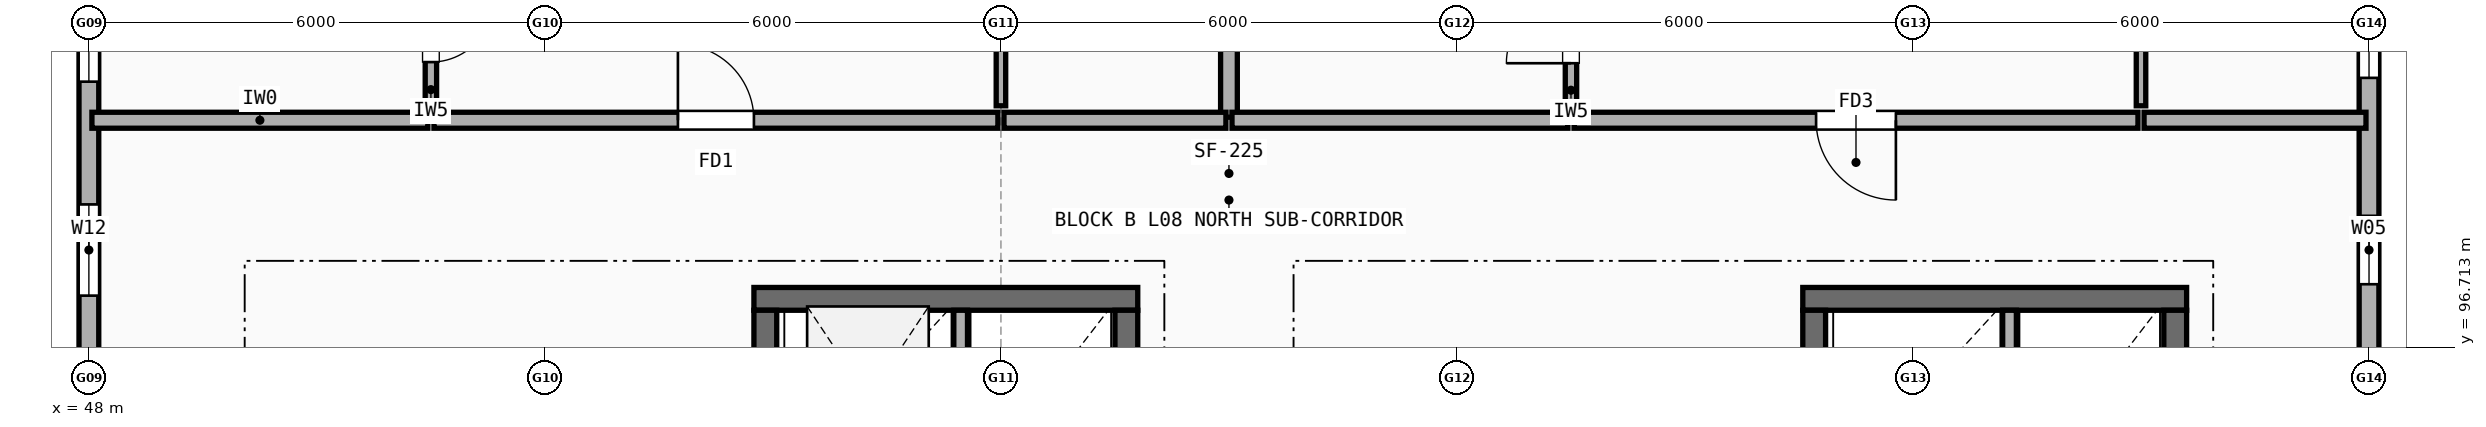
"""IFC4 building model, lengths in metres.
Left out: names, types, materials, properties, quantities, classifications, styles, units other than length and angle.
Written with IfcOpenShell. Run it as: python <this file> out.ifc"""

import sys

from ifc_helpers import new_model, si_unit, direction, frame, frame_2d, origin, place, context, subcontext, project, spatial, rectangle, extrude, element, fill, save


model = new_model("IFC4")
c1 = context("Model", 3, precision=1e-05, world=origin(), true_north=direction((0.0, 1.0)))
c2 = subcontext(c1, "Body", "Model", "MODEL_VIEW")
j1 = project(units=[si_unit("LENGTHUNIT", "METRE"), si_unit("PLANEANGLEUNIT", "RADIAN")], contexts=[c1])
p1 = place(None, origin())
s1 = spatial("IfcSite", under=j1, at=p1, CompositionType="ELEMENT")
p2 = place(p1, origin())
s2 = spatial("IfcBuilding", under=s1, at=p2, CompositionType="ELEMENT")
p3 = place(p2, frame((0.0, 0.0, 26.9)))
s3 = spatial("IfcBuildingStorey", under=s2, at=p3, CompositionType="ELEMENT", Elevation=26.9)
p4 = place(p3, frame((78.0, 96.325, 0.0), z_axis=(0.0, 0.0, 1.0), x_axis=(0.0, 1.0, 0.0)))
e1 = element("IfcWall", 1, at=p4, inside=s3, PredefinedType="STANDARD", context=c2, shape_type="SweptSolid", body=[
    extrude(rectangle(XDim=5.35, YDim=0.26, at=frame_2d((2.675, 0.0))), origin(), (0.0, 0.0, 1.0), 2.462),
])
p5 = place(p4, frame((1.218, 0.0, 0.9)))
e2 = element("IfcOpeningElement", 2, at=p5, cuts=e1, PredefinedType="OPENING", context=c2, shape_type="SweptSolid", body=[
    extrude(rectangle(XDim=0.9, YDim=1.4, at=frame_2d((0.45, 0.7))), frame((0.0, 0.14, 0.0), z_axis=(0.0, -1.0, 0.0), x_axis=(1.0, 0.0, 0.0)), (0.0, 0.0, 1.0), 0.28),
])
p6 = place(p4, frame((3.933, 0.0, 0.9)))
e3 = element("IfcOpeningElement", 3, at=p6, cuts=e1, PredefinedType="OPENING", context=c2, shape_type="SweptSolid", body=[
    extrude(rectangle(XDim=0.9, YDim=1.4, at=frame_2d((0.45, 0.7))), frame((0.0, 0.14, 0.0), z_axis=(0.0, -1.0, 0.0), x_axis=(1.0, 0.0, 0.0)), (0.0, 0.0, 1.0), 0.28),
])
p7 = place(p3, frame((48.0, 101.675, 0.0), z_axis=(0.0, 0.0, 1.0), x_axis=(0.0, -1.0, 0.0)))
e4 = element("IfcWall", 4, at=p7, inside=s3, PredefinedType="STANDARD", context=c2, shape_type="SweptSolid", body=[
    extrude(rectangle(XDim=5.35, YDim=0.26, at=frame_2d((2.675, 0.0))), origin(), (0.0, 0.0, 1.0), 2.462),
])
p8 = place(p7, frame((0.468, 0.0, 0.9)))
e5 = element("IfcOpeningElement", 5, at=p8, cuts=e4, PredefinedType="OPENING", context=c2, shape_type="SweptSolid", body=[
    extrude(rectangle(XDim=1.0, YDim=1.4, at=frame_2d((0.5, 0.7))), frame((0.0, 0.14, 0.0), z_axis=(0.0, -1.0, 0.0), x_axis=(1.0, 0.0, 0.0)), (0.0, 0.0, 1.0), 0.28),
])
p9 = place(p7, frame((3.083, 0.0, 0.9)))
e6 = element("IfcOpeningElement", 6, at=p9, cuts=e4, PredefinedType="OPENING", context=c2, shape_type="SweptSolid", body=[
    extrude(rectangle(XDim=1.2, YDim=1.35, at=frame_2d((0.6, 0.675))), frame((0.0, 0.14, 0.0), z_axis=(0.0, -1.0, 0.0), x_axis=(1.0, 0.0, 0.0)), (0.0, 0.0, 1.0), 0.28),
])
p10 = place(p3, frame((61.8, 97.35, 0.0), z_axis=(0.0, 0.0, 1.0), x_axis=(-1.0, 0.0, 0.0)))
e7 = element("IfcWall", 7, at=p10, inside=s3, PredefinedType="SHEAR", context=c2, shape_type="SweptSolid", body=[
    extrude(rectangle(XDim=5.05, YDim=0.3, at=frame_2d((2.525, 0.0))), origin(), (0.0, 0.0, 1.0), 2.98),
])
p11 = place(p3, frame((61.65, 90.75, 0.0), z_axis=(0.0, 0.0, 1.0), x_axis=(0.0, 1.0, 0.0)))
e8 = element("IfcWall", 8, at=p11, inside=s3, PredefinedType="SHEAR", context=c2, shape_type="SweptSolid", body=[
    extrude(rectangle(XDim=6.45, YDim=0.3, at=frame_2d((3.225, 0.0))), origin(), (0.0, 0.0, 1.0), 2.98),
])
p12 = place(p3, frame((56.9, 93.75, 0.0), z_axis=(0.0, 0.0, 1.0), x_axis=(0.0, 1.0, 0.0)))
e9 = element("IfcWall", 9, at=p12, inside=s3, PredefinedType="SHEAR", context=c2, shape_type="SweptSolid", body=[
    extrude(rectangle(XDim=3.45, YDim=0.3, at=frame_2d((1.725, 0.0))), origin(), (0.0, 0.0, 1.0), 2.98),
])
p13 = place(p3, frame((59.47, 94.94, 0.0), z_axis=(0.0, 0.0, 1.0), x_axis=(0.0, 1.0, 0.0)))
e10 = element("IfcWall", 10, at=p13, inside=s3, PredefinedType="SOLIDWALL", context=c2, shape_type="SweptSolid", body=[
    extrude(rectangle(XDim=2.26, YDim=0.18, at=frame_2d((1.13, 0.0))), origin(), (0.0, 0.0, 1.0), 2.98),
])
p14 = place(p3, frame((75.6, 97.35, 0.0), z_axis=(0.0, 0.0, 1.0), x_axis=(-1.0, 0.0, 0.0)))
e11 = element("IfcWall", 11, at=p14, inside=s3, PredefinedType="SHEAR", context=c2, shape_type="SweptSolid", body=[
    extrude(rectangle(XDim=5.05, YDim=0.3, at=frame_2d((2.525, 0.0))), origin(), (0.0, 0.0, 1.0), 2.98),
])
p15 = place(p3, frame((75.45, 90.75, 0.0), z_axis=(0.0, 0.0, 1.0), x_axis=(0.0, 1.0, 0.0)))
e12 = element("IfcWall", 12, at=p15, inside=s3, PredefinedType="SHEAR", context=c2, shape_type="SweptSolid", body=[
    extrude(rectangle(XDim=6.45, YDim=0.3, at=frame_2d((3.225, 0.0))), origin(), (0.0, 0.0, 1.0), 2.98),
])
p16 = place(p3, frame((70.7, 93.65, 0.0), z_axis=(0.0, 0.0, 1.0), x_axis=(0.0, 1.0, 0.0)))
e13 = element("IfcWall", 13, at=p16, inside=s3, PredefinedType="SHEAR", context=c2, shape_type="SweptSolid", body=[
    extrude(rectangle(XDim=3.55, YDim=0.3, at=frame_2d((1.775, 0.0))), origin(), (0.0, 0.0, 1.0), 2.98),
])
p17 = place(p3, frame((73.27, 94.94, 0.0), z_axis=(0.0, 0.0, 1.0), x_axis=(0.0, 1.0, 0.0)))
e14 = element("IfcWall", 14, at=p17, inside=s3, PredefinedType="SOLIDWALL", context=c2, shape_type="SweptSolid", body=[
    extrude(rectangle(XDim=2.26, YDim=0.18, at=frame_2d((1.13, 0.0))), origin(), (0.0, 0.0, 1.0), 2.98),
])
p18 = place(p3, frame((63.0, 99.74, 0.0), z_axis=(0.0, 0.0, 1.0), x_axis=(0.0, 1.0, 0.0)))
e15 = element("IfcWall", 15, at=p18, inside=s3, PredefinedType="SOLIDWALL", context=c2, shape_type="SweptSolid", body=[
    extrude(rectangle(XDim=13.87, YDim=0.22, at=frame_2d((6.935, 0.0))), origin(), (0.0, 0.0, 1.0), 2.462),
])
p19 = place(p3, frame((48.04, 99.7, 0.0), z_axis=(0.0, 0.0, 1.0), x_axis=(1.0, 0.0, 0.0)))
e16 = element("IfcWall", 16, at=p19, inside=s3, PredefinedType="SOLIDWALL", context=c2, shape_type="SweptSolid", body=[
    extrude(rectangle(XDim=4.42, YDim=0.21, at=frame_2d((2.21, 0.0))), origin(), (0.0, 0.0, 1.0), 2.462),
])
p20 = place(p3, frame((52.54, 99.7, 0.0), z_axis=(0.0, 0.0, 1.0), x_axis=(1.0, 0.0, 0.0)))
e17 = element("IfcWall", 17, at=p20, inside=s3, PredefinedType="SOLIDWALL", context=c2, shape_type="SweptSolid", body=[
    extrude(rectangle(XDim=7.42, YDim=0.21, at=frame_2d((3.71, 0.0))), origin(), (0.0, 0.0, 1.0), 2.508),
])
p21 = place(p20, frame((3.21, 0.0, 0.0)))
e18 = element("IfcOpeningElement", 18, at=p21, cuts=e17, PredefinedType="OPENING", context=c2, shape_type="SweptSolid", body=[
    extrude(rectangle(XDim=1.0, YDim=2.15, at=frame_2d((0.5, 1.075))), frame((0.0, 0.115, 0.0), z_axis=(0.0, -1.0, 0.0), x_axis=(1.0, 0.0, 0.0)), (0.0, 0.0, 1.0), 0.23),
])
p22 = place(p3, frame((52.5, 99.89, 0.0), z_axis=(0.0, 0.0, 1.0), x_axis=(0.0, 1.0, 0.0)))
e19 = element("IfcWall", 19, at=p22, inside=s3, PredefinedType="PARTITIONING", context=c2, shape_type="SweptSolid", body=[
    extrude(rectangle(XDim=1.97, YDim=0.15, at=frame_2d((0.985, 0.0))), origin(), (0.0, 0.0, 1.0), 2.98),
])
p23 = place(p22, frame((0.575, 0.0, 0.0)))
e20 = element("IfcOpeningElement", 20, at=p23, cuts=e19, PredefinedType="OPENING", context=c2, shape_type="SweptSolid", body=[
    extrude(rectangle(XDim=0.82, YDim=2.08, at=frame_2d((0.41, 1.04))), frame((0.0, 0.085, 0.0), z_axis=(0.0, -1.0, 0.0), x_axis=(1.0, 0.0, 0.0)), (0.0, 0.0, 1.0), 0.17),
])
p24 = place(p3, frame((60.04, 99.7, 0.0), z_axis=(0.0, 0.0, 1.0), x_axis=(1.0, 0.0, 0.0)))
e21 = element("IfcWall", 21, at=p24, inside=s3, PredefinedType="SOLIDWALL", context=c2, shape_type="SweptSolid", body=[
    extrude(rectangle(XDim=2.92, YDim=0.21, at=frame_2d((1.46, 0.0))), origin(), (0.0, 0.0, 1.0), 2.508),
])
p25 = place(p3, frame((60.0, 99.89, 0.0), z_axis=(0.0, 0.0, 1.0), x_axis=(0.0, 1.0, 0.0)))
e22 = element("IfcWall", 22, at=p25, inside=s3, PredefinedType="PARTITIONING", context=c2, shape_type="SweptSolid", body=[
    extrude(rectangle(XDim=13.6, YDim=0.125, at=frame_2d((6.8, 0.0))), origin(), (0.0, 0.0, 1.0), 2.458),
])
p26 = place(p25, frame((6.65, 0.0, 0.0)))
e23 = element("IfcOpeningElement", 23, at=p26, cuts=e22, PredefinedType="OPENING", context=c2, shape_type="SweptSolid", body=[
    extrude(rectangle(XDim=0.88, YDim=2.1, at=frame_2d((0.44, 1.05))), frame((0.0, 0.073, 0.0), z_axis=(0.0, -1.0, 0.0), x_axis=(1.0, 0.0, 0.0)), (0.0, 0.0, 1.0), 0.145),
])
p27 = place(p3, frame((63.04, 99.7, 0.0), z_axis=(0.0, 0.0, 1.0), x_axis=(1.0, 0.0, 0.0)))
e24 = element("IfcWall", 24, at=p27, inside=s3, PredefinedType="SOLIDWALL", context=c2, shape_type="SweptSolid", body=[
    extrude(rectangle(XDim=4.42, YDim=0.21, at=frame_2d((2.21, 0.0))), origin(), (0.0, 0.0, 1.0), 2.98),
])
p28 = place(p3, frame((67.54, 99.7, 0.0), z_axis=(0.0, 0.0, 1.0), x_axis=(1.0, 0.0, 0.0)))
e25 = element("IfcWall", 25, at=p28, inside=s3, PredefinedType="SOLIDWALL", context=c2, shape_type="SweptSolid", body=[
    extrude(rectangle(XDim=7.42, YDim=0.21, at=frame_2d((3.71, 0.0))), origin(), (0.0, 0.0, 1.0), 2.98),
])
p29 = place(p28, frame((3.185, 0.0, 0.0)))
e26 = element("IfcOpeningElement", 26, at=p29, cuts=e25, PredefinedType="OPENING", context=c2, shape_type="SweptSolid", body=[
    extrude(rectangle(XDim=1.05, YDim=2.15, at=frame_2d((0.525, 1.075))), frame((0.0, 0.115, 0.0), z_axis=(0.0, -1.0, 0.0), x_axis=(1.0, 0.0, 0.0)), (0.0, 0.0, 1.0), 0.23),
])
p30 = place(p3, frame((67.5, 99.89, 0.0), z_axis=(0.0, 0.0, 1.0), x_axis=(0.0, 1.0, 0.0)))
e27 = element("IfcWall", 27, at=p30, inside=s3, PredefinedType="PARTITIONING", context=c2, shape_type="SweptSolid", body=[
    extrude(rectangle(XDim=1.97, YDim=0.15, at=frame_2d((0.985, 0.0))), origin(), (0.0, 0.0, 1.0), 2.98),
])
p31 = place(p30, frame((0.56, 0.0, 0.0)))
e28 = element("IfcOpeningElement", 28, at=p31, cuts=e27, PredefinedType="OPENING", context=c2, shape_type="SweptSolid", body=[
    extrude(rectangle(XDim=0.85, YDim=2.1, at=frame_2d((0.425, 1.05))), frame((0.0, 0.085, 0.0), z_axis=(0.0, -1.0, 0.0), x_axis=(1.0, 0.0, 0.0)), (0.0, 0.0, 1.0), 0.17),
])
p32 = place(p3, frame((75.04, 99.7, 0.0), z_axis=(0.0, 0.0, 1.0), x_axis=(1.0, 0.0, 0.0)))
e29 = element("IfcWall", 29, at=p32, inside=s3, PredefinedType="SOLIDWALL", context=c2, shape_type="SweptSolid", body=[
    extrude(rectangle(XDim=2.92, YDim=0.21, at=frame_2d((1.46, 0.0))), origin(), (0.0, 0.0, 1.0), 2.462),
])
p33 = place(p3, frame((75.0, 99.89, 0.0), z_axis=(0.0, 0.0, 1.0), x_axis=(0.0, 1.0, 0.0)))
e30 = element("IfcWall", 30, at=p33, inside=s3, PredefinedType="PARTITIONING", context=c2, shape_type="SweptSolid", body=[
    extrude(rectangle(XDim=13.92, YDim=0.125, at=frame_2d((6.96, 0.0))), origin(), (0.0, 0.0, 1.0), 2.462),
])
p34 = place(p33, frame((6.65, 0.0, 0.0)))
e31 = element("IfcOpeningElement", 31, at=p34, cuts=e30, PredefinedType="OPENING", context=c2, shape_type="SweptSolid", body=[
    extrude(rectangle(XDim=0.9, YDim=2.1, at=frame_2d((0.45, 1.05))), frame((0.0, 0.073, 0.0), z_axis=(0.0, -1.0, 0.0), x_axis=(1.0, 0.0, 0.0)), (0.0, 0.0, 1.0), 0.145),
])
p35 = place(p5, origin())
e32 = element("IfcWindow", 32, at=p35, inside=s3, PartitioningType="SINGLE_PANEL", PredefinedType="WINDOW", context=c2, shape_type="SweptSolid", body=[
    extrude(rectangle(XDim=0.9, YDim=1.4, at=frame_2d((0.45, 0.7))), frame((0.0, 0.03, 0.0), z_axis=(0.0, -1.0, 0.0), x_axis=(1.0, 0.0, 0.0)), (0.0, 0.0, 1.0), 0.06),
])
fill(e2, e32)
p36 = place(p6, origin())
e33 = element("IfcWindow", 33, at=p36, inside=s3, PartitioningType="SINGLE_PANEL", PredefinedType="WINDOW", context=c2, shape_type="SweptSolid", body=[
    extrude(rectangle(XDim=0.9, YDim=1.4, at=frame_2d((0.45, 0.7))), frame((0.0, 0.03, 0.0), z_axis=(0.0, -1.0, 0.0), x_axis=(1.0, 0.0, 0.0)), (0.0, 0.0, 1.0), 0.06),
])
fill(e3, e33)
p37 = place(p8, origin())
e34 = element("IfcWindow", 34, at=p37, inside=s3, PartitioningType="SINGLE_PANEL", PredefinedType="WINDOW", context=c2, shape_type="SweptSolid", body=[
    extrude(rectangle(XDim=1.0, YDim=1.4, at=frame_2d((0.5, 0.7))), frame((0.0, 0.03, 0.0), z_axis=(0.0, -1.0, 0.0), x_axis=(1.0, 0.0, 0.0)), (0.0, 0.0, 1.0), 0.06),
])
fill(e5, e34)
p38 = place(p9, origin())
e35 = element("IfcWindow", 35, at=p38, inside=s3, PartitioningType="SINGLE_PANEL", PredefinedType="WINDOW", context=c2, shape_type="SweptSolid", body=[
    extrude(rectangle(XDim=1.2, YDim=1.35, at=frame_2d((0.6, 0.675))), frame((0.0, 0.03, 0.0), z_axis=(0.0, -1.0, 0.0), x_axis=(1.0, 0.0, 0.0)), (0.0, 0.0, 1.0), 0.06),
])
fill(e6, e35)
p39 = place(p21, origin())
e36 = element("IfcDoor", 36, at=p39, inside=s3, OperationType="SINGLE_SWING_LEFT", PredefinedType="DOOR", context=c2, shape_type="SweptSolid", body=[
    extrude(rectangle(XDim=1.0, YDim=2.15, at=frame_2d((0.5, 1.075))), frame((0.0, 0.025, 0.0), z_axis=(0.0, -1.0, 0.0), x_axis=(1.0, 0.0, 0.0)), (0.0, 0.0, 1.0), 0.05),
])
fill(e18, e36)
p40 = place(p23, origin())
e37 = element("IfcDoor", 37, at=p40, inside=s3, OperationType="SINGLE_SWING_RIGHT", PredefinedType="DOOR", context=c2, shape_type="SweptSolid", body=[
    extrude(rectangle(XDim=0.82, YDim=2.08, at=frame_2d((0.41, 1.04))), frame((0.0, 0.025, 0.0), z_axis=(0.0, -1.0, 0.0), x_axis=(1.0, 0.0, 0.0)), (0.0, 0.0, 1.0), 0.05),
])
fill(e20, e37)
p41 = place(p29, origin())
e38 = element("IfcDoor", 38, at=p41, inside=s3, OperationType="SINGLE_SWING_RIGHT", PredefinedType="DOOR", context=c2, shape_type="SweptSolid", body=[
    extrude(rectangle(XDim=1.05, YDim=2.15, at=frame_2d((0.525, 1.075))), frame((0.0, 0.025, 0.0), z_axis=(0.0, -1.0, 0.0), x_axis=(1.0, 0.0, 0.0)), (0.0, 0.0, 1.0), 0.05),
])
fill(e26, e38)
p42 = place(p31, origin())
e39 = element("IfcDoor", 39, at=p42, inside=s3, OperationType="SINGLE_SWING_LEFT", PredefinedType="DOOR", context=c2, shape_type="SweptSolid", body=[
    extrude(rectangle(XDim=0.85, YDim=2.1, at=frame_2d((0.425, 1.05))), frame((0.0, 0.025, 0.0), z_axis=(0.0, -1.0, 0.0), x_axis=(1.0, 0.0, 0.0)), (0.0, 0.0, 1.0), 0.05),
])
fill(e28, e39)
save(model, sys.argv[1])
